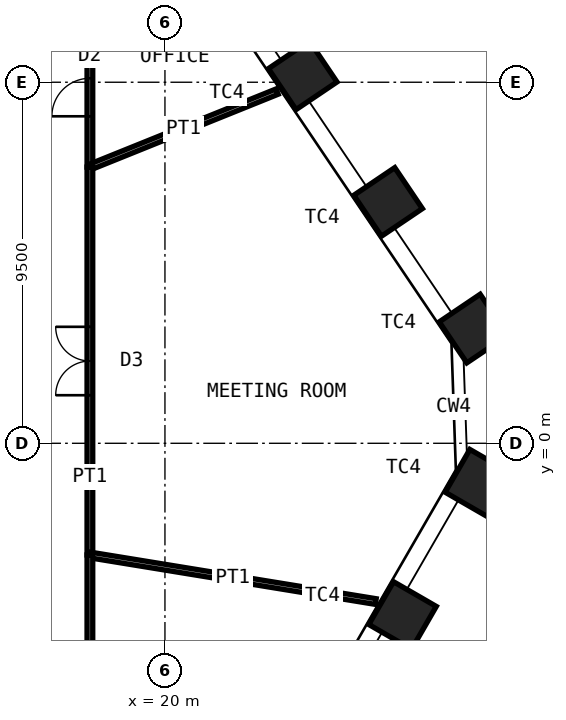
"""IFC4 building model, lengths in metres.
Left out: names, types, materials, properties, quantities, classifications, styles, units other than length and angle.
Written with IfcOpenShell. Run it as: python <this file> out.ifc"""

import sys

from ifc_helpers import new_model, si_unit, direction, frame, frame_2d, origin, origin_2d, place, context, subcontext, project, spatial, rectangle, hollow_rectangle, extrude, element, fill, save


model = new_model("IFC4")
c1 = context("Model", 3, precision=1e-05, world=origin(), true_north=direction((0.0, 1.0)))
c2 = subcontext(c1, "Body", "Model", "MODEL_VIEW")
j1 = project(units=[si_unit("LENGTHUNIT", "METRE"), si_unit("PLANEANGLEUNIT", "RADIAN")], contexts=[c1])
p1 = place(None, origin())
s1 = spatial("IfcSite", under=j1, at=p1, CompositionType="ELEMENT")
p2 = place(p1, origin())
s2 = spatial("IfcBuilding", under=s1, at=p2, CompositionType="ELEMENT")
p3 = place(p2, frame((0.0, 0.0, 153.4)))
s3 = spatial("IfcBuildingStorey", under=s2, at=p3, CompositionType="ELEMENT", Elevation=153.4)
for number, where, z_axis, x_axis in (
    (1, (23.625, 9.682, 0.0), (0.0, 0.0, 1.0), (-0.559, 0.829, 0.0)),
    (2, (25.872, 6.351, 0.0), (0.0, 0.0, 1.0), (-0.559, 0.829, 0.0)),
    (3, (28.119, 3.019, 0.0), (0.0, 0.0, 1.0), (-0.559, 0.829, 0.0)),
    (4, (28.261, -1.05, 0.0), (0.0, 0.0, 1.0), (0.5, 0.866, 0.0)),
    (5, (26.252, -4.53, 0.0), (0.0, 0.0, 1.0), (0.5, 0.866, 0.0)),
):
    element("IfcColumn", number, at=place(p3, frame(where, z_axis=z_axis, x_axis=x_axis)), inside=s3, PredefinedType="COLUMN", context=c2, shape_type="SweptSolid", body=[
        extrude(hollow_rectangle(XDim=1.3, YDim=1.3, WallThickness=0.1, at=origin_2d()), origin(), (0.0, 0.0, 1.0), 4.2),
    ])
p4 = place(p3, frame((18.025, 10.941, 0.0), z_axis=(0.0, 0.0, 1.0), x_axis=(0.0, -1.0, 0.0)))
e6 = element("IfcWall", 6, at=p4, inside=s3, PredefinedType="PARTITIONING", context=c2, shape_type="SweptSolid", body=[
    extrude(rectangle(XDim=3.673, YDim=0.15, at=frame_2d((1.837, 0.0))), origin(), (0.0, 0.0, 1.0), 4.03),
])
p5 = place(p4, frame((1.337, 0.0, 0.0)))
e7 = element("IfcOpeningElement", 7, at=p5, cuts=e6, PredefinedType="OPENING", context=c2, shape_type="SweptSolid", body=[
    extrude(rectangle(XDim=1.0, YDim=2.4, at=frame_2d((0.5, 1.2))), frame((0.0, 0.085, 0.0), z_axis=(0.0, -1.0, 0.0), x_axis=(1.0, 0.0, 0.0)), (0.0, 0.0, 1.0), 0.17),
])
p6 = place(p3, frame((22.951, 9.254, 0.0), z_axis=(0.0, 0.0, 1.0), x_axis=(-0.927452527427, -0.37394091695, 0.0)))
e8 = element("IfcWall", 8, at=p6, inside=s3, PredefinedType="PARTITIONING", context=c2, shape_type="SweptSolid", body=[
    extrude(rectangle(XDim=5.312, YDim=0.15, at=frame_2d((2.656, 0.0))), origin(), (0.0, 0.0, 1.0), 3.33),
])
p7 = place(p3, frame((18.025, 7.267, 0.0), z_axis=(0.0, 0.0, 1.0), x_axis=(0.0, -1.0, 0.0)))
e9 = element("IfcWall", 9, at=p7, inside=s3, PredefinedType="PARTITIONING", context=c2, shape_type="SweptSolid", body=[
    extrude(rectangle(XDim=10.205, YDim=0.15, at=frame_2d((5.103, 0.0))), origin(), (0.0, 0.0, 1.0), 4.03),
])
p8 = place(p7, frame((4.203, 0.0, 0.0)))
e10 = element("IfcOpeningElement", 10, at=p8, cuts=e9, PredefinedType="OPENING", context=c2, shape_type="SweptSolid", body=[
    extrude(rectangle(XDim=1.8, YDim=2.4, at=frame_2d((0.9, 1.2))), frame((0.0, 0.085, 0.0), z_axis=(0.0, -1.0, 0.0), x_axis=(1.0, 0.0, 0.0)), (0.0, 0.0, 1.0), 0.17),
])
p9 = place(p3, frame((25.547, -4.164, 0.0), z_axis=(0.0, 0.0, 1.0), x_axis=(-0.986975470567, 0.160870819291, 0.0)))
e11 = element("IfcWall", 11, at=p9, inside=s3, PredefinedType="PARTITIONING", context=c2, shape_type="SweptSolid", body=[
    extrude(rectangle(XDim=7.622, YDim=0.15, at=frame_2d((3.811, 0.0))), origin(), (0.0, 0.0, 1.0), 4.03),
])
p10 = place(p3, frame((18.025, -2.938, 0.0), z_axis=(0.0, 0.0, 1.0), x_axis=(0.0, -1.0, 0.0)))
e12 = element("IfcWall", 12, at=p10, inside=s3, PredefinedType="PARTITIONING", context=c2, shape_type="SweptSolid", body=[
    extrude(rectangle(XDim=8.687, YDim=0.15, at=frame_2d((4.344, 0.0))), origin(), (0.0, 0.0, 1.0), 4.03),
])
p11 = place(p10, frame((3.443, 0.0, 0.0)))
e13 = element("IfcOpeningElement", 13, at=p11, cuts=e12, PredefinedType="OPENING", context=c2, shape_type="SweptSolid", body=[
    extrude(rectangle(XDim=1.8, YDim=2.4, at=frame_2d((0.9, 1.2))), frame((0.0, 0.085, 0.0), z_axis=(0.0, -1.0, 0.0), x_axis=(1.0, 0.0, 0.0)), (0.0, 0.0, 1.0), 0.17),
])
p12 = place(p5, origin())
e14 = element("IfcDoor", 14, at=p12, inside=s3, OperationType="SINGLE_SWING_RIGHT", PredefinedType="DOOR", context=c2, shape_type="SweptSolid", body=[
    extrude(rectangle(XDim=1.0, YDim=2.4, at=frame_2d((0.5, 1.2))), frame((0.0, 0.025, 0.0), z_axis=(0.0, -1.0, 0.0), x_axis=(1.0, 0.0, 0.0)), (0.0, 0.0, 1.0), 0.05),
])
fill(e7, e14)
p13 = place(p8, origin())
e15 = element("IfcDoor", 15, at=p13, inside=s3, OperationType="DOUBLE_DOOR_DOUBLE_SWING", PredefinedType="DOOR", context=c2, shape_type="SweptSolid", body=[
    extrude(rectangle(XDim=1.8, YDim=2.4, at=frame_2d((0.9, 1.2))), frame((0.0, 0.025, 0.0), z_axis=(0.0, -1.0, 0.0), x_axis=(1.0, 0.0, 0.0)), (0.0, 0.0, 1.0), 0.05),
])
fill(e10, e15)
save(model, sys.argv[1])
